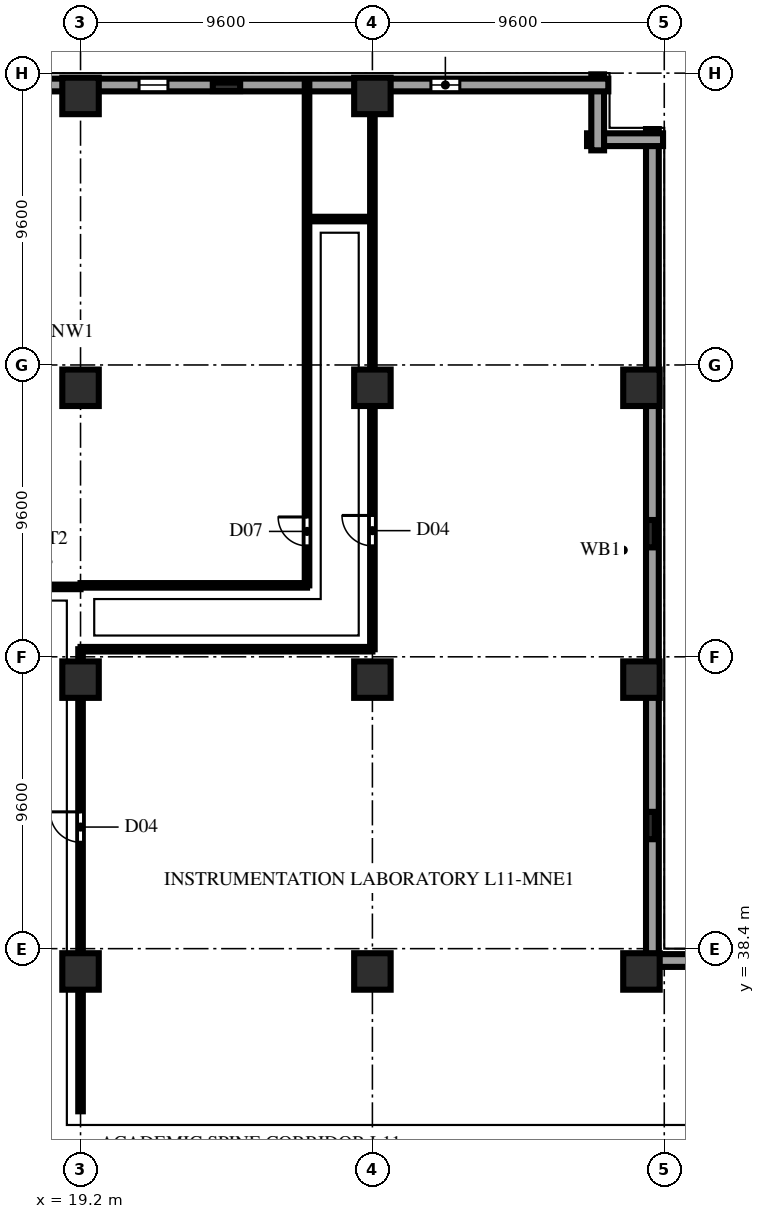
"""IFC4 building model, lengths in metres.
Left out: names, types, materials, properties, quantities, classifications, styles, units other than length and angle.
Written with IfcOpenShell. Run it as: python <this file> out.ifc"""

import sys

from ifc_helpers import new_model, si_unit, direction, frame, frame_2d, origin, origin_2d, place, context, subcontext, project, spatial, rectangle, extrude, element, fill, save


model = new_model("IFC4")
c1 = context("Model", 3, precision=1e-05, world=origin(), true_north=direction((0.0, 1.0)))
c2 = subcontext(c1, "Body", "Model", "MODEL_VIEW")
j1 = project(units=[si_unit("LENGTHUNIT", "METRE"), si_unit("PLANEANGLEUNIT", "RADIAN")], contexts=[c1])
p1 = place(None, origin())
s1 = spatial("IfcSite", under=j1, at=p1, CompositionType="ELEMENT")
p2 = place(p1, origin())
s2 = spatial("IfcBuilding", under=s1, at=p2, CompositionType="ELEMENT")
p3 = place(p2, frame((0.0, 0.0, 47.0)))
s3 = spatial("IfcBuildingStorey", under=s2, at=p3, CompositionType="ELEMENT", Elevation=47.0)
for number, where, z_axis, x_axis in (
    (1, (19.2, 37.65, 0.0), (0.0, 0.0, 1.0), (1.0, 0.0, 0.0)),
    (2, (19.2, 47.25, 0.0), (0.0, 0.0, 1.0), (1.0, 0.0, 0.0)),
    (3, (19.2, 56.85, 0.0), (0.0, 0.0, 1.0), (1.0, 0.0, 0.0)),
    (4, (19.2, 66.45, 0.0), (0.0, 0.0, 1.0), (1.0, 0.0, 0.0)),
    (5, (28.8, 37.65, 0.0), (0.0, 0.0, 1.0), (1.0, 0.0, 0.0)),
    (6, (28.8, 47.25, 0.0), (0.0, 0.0, 1.0), (1.0, 0.0, 0.0)),
    (7, (28.8, 56.85, 0.0), (0.0, 0.0, 1.0), (1.0, 0.0, 0.0)),
    (8, (28.8, 66.45, 0.0), (0.0, 0.0, 1.0), (1.0, 0.0, 0.0)),
    (9, (37.65, 37.65, 0.0), (0.0, 0.0, 1.0), (1.0, 0.0, 0.0)),
    (10, (37.65, 47.25, 0.0), (0.0, 0.0, 1.0), (1.0, 0.0, 0.0)),
    (11, (37.65, 56.85, 0.0), (0.0, 0.0, 1.0), (1.0, 0.0, 0.0)),
):
    element("IfcColumn", number, at=place(p3, frame(where, z_axis=z_axis, x_axis=x_axis)), inside=s3, PredefinedType="COLUMN", context=c2, shape_type="SweptSolid", body=[
        extrude(rectangle(XDim=1.2, YDim=1.2, at=origin_2d()), origin(), (0.0, 0.0, 1.0), 3.8),
    ])
for number, where, z_axis, x_axis in (
    (12, (24.0, 66.75, 0.0), (0.0, 0.0, 1.0), (1.0, 0.0, 0.0)),
    (13, (37.95, 42.45, 0.0), (0.0, 0.0, 1.0), (0.0, 1.0, 0.0)),
    (14, (37.95, 52.05, 0.0), (0.0, 0.0, 1.0), (0.0, 1.0, 0.0)),
):
    element("IfcColumn", number, at=place(p3, frame(where, z_axis=z_axis, x_axis=x_axis)), inside=s3, PredefinedType="PILASTER", context=c2, shape_type="SweptSolid", body=[
        extrude(rectangle(XDim=0.9, YDim=0.28, at=origin_2d()), origin(), (0.0, 0.0, 1.0), 3.8),
    ])
for number, where, z_axis, x_axis in (
    (15, (65.36, 38.01, 0.0), (0.0, 0.0, 1.0), (-1.0, 0.0, 0.0)),
    (16, (38.01, 37.66, 0.0), (0.0, 0.0, 1.0), (0.0, 1.0, 0.0)),
):
    element("IfcWall", number, at=place(p3, frame(where, z_axis=z_axis, x_axis=x_axis)), inside=s3, PredefinedType="SOLIDWALL", context=c2, shape_type="SweptSolid", body=[
        extrude(rectangle(XDim=27.7, YDim=0.42, at=frame_2d((13.85, 0.0))), origin(), (0.0, 0.0, 1.0), 3.54),
    ])
for number, where, z_axis, x_axis in (
    (17, (38.36, 65.01, 0.0), (0.0, 0.0, 1.0), (-1.0, 0.0, 0.0)),
    (18, (36.21, 64.66, 0.0), (0.0, 0.0, 1.0), (0.0, 1.0, 0.0)),
):
    element("IfcWall", number, at=place(p3, frame(where, z_axis=z_axis, x_axis=x_axis)), inside=s3, PredefinedType="SOLIDWALL", context=c2, shape_type="SweptSolid", body=[
        extrude(rectangle(XDim=2.5, YDim=0.42, at=frame_2d((1.25, 0.0))), origin(), (0.0, 0.0, 1.0), 3.54),
    ])
p4 = place(p3, frame((36.56, 66.81, 0.0), z_axis=(0.0, 0.0, 1.0), x_axis=(-1.0, 0.0, 0.0)))
e19 = element("IfcWall", 19, at=p4, inside=s3, PredefinedType="SOLIDWALL", context=c2, shape_type="SweptSolid", body=[
    extrude(rectangle(XDim=34.72, YDim=0.42, at=frame_2d((17.36, 0.0))), origin(), (0.0, 0.0, 1.0), 3.54),
])
p5 = place(p4, frame((4.885, 0.0, 0.9)))
e20 = element("IfcOpeningElement", 20, at=p5, cuts=e19, PredefinedType="OPENING", context=c2, shape_type="SweptSolid", body=[
    extrude(rectangle(XDim=0.95, YDim=1.85, at=frame_2d((0.475, 0.925))), frame((0.0, 0.222, 0.0), z_axis=(0.0, -1.0, 0.0), x_axis=(1.0, 0.0, 0.0)), (0.0, 0.0, 1.0), 0.444),
])
p6 = place(p4, frame((14.485, 0.0, 0.9)))
e21 = element("IfcOpeningElement", 21, at=p6, cuts=e19, PredefinedType="OPENING", context=c2, shape_type="SweptSolid", body=[
    extrude(rectangle(XDim=0.95, YDim=1.85, at=frame_2d((0.475, 0.925))), frame((0.0, 0.222, 0.0), z_axis=(0.0, -1.0, 0.0), x_axis=(1.0, 0.0, 0.0)), (0.0, 0.0, 1.0), 0.444),
])
p7 = place(p3, frame((17.05, 50.3, 0.0), z_axis=(0.0, 0.0, 1.0), x_axis=(1.0, 0.0, 0.0)))
e22 = element("IfcWall", 22, at=p7, inside=s3, PredefinedType="PARTITIONING", context=c2, shape_type="SweptSolid", body=[
    extrude(rectangle(XDim=2.15, YDim=0.15, at=frame_2d((1.075, 0.0))), origin(), (0.0, 0.0, 1.0), 3.54),
])
p8 = place(p3, frame((19.2, 33.05, 0.0), z_axis=(0.0, 0.0, 1.0), x_axis=(0.0, 1.0, 0.0)))
e23 = element("IfcWall", 23, at=p8, inside=s3, PredefinedType="PARTITIONING", context=c2, shape_type="SweptSolid", body=[
    extrude(rectangle(XDim=15.2, YDim=0.15, at=frame_2d((7.6, 0.0))), origin(), (0.0, 0.0, 1.0), 3.184),
])
p9 = place(p8, frame((8.85, 0.0, 0.0)))
e24 = element("IfcOpeningElement", 24, at=p9, cuts=e23, PredefinedType="OPENING", context=c2, shape_type="SweptSolid", body=[
    extrude(rectangle(XDim=1.0, YDim=2.2, at=frame_2d((0.5, 1.1))), frame((0.0, 0.087, 0.0), z_axis=(0.0, -1.0, 0.0), x_axis=(1.0, 0.0, 0.0)), (0.0, 0.0, 1.0), 0.174),
])
p10 = place(p3, frame((19.2, 48.25, 0.0), z_axis=(0.0, 0.0, 1.0), x_axis=(1.0, 0.0, 0.0)))
e25 = element("IfcWall", 25, at=p10, inside=s3, PredefinedType="PARTITIONING", context=c2, shape_type="SweptSolid", body=[
    extrude(rectangle(XDim=9.6, YDim=0.15, at=frame_2d((4.8, 0.0))), origin(), (0.0, 0.0, 1.0), 3.54),
])
p11 = place(p3, frame((19.2, 50.35, 0.0), z_axis=(0.0, 0.0, 1.0), x_axis=(1.0, 0.0, 0.0)))
e26 = element("IfcWall", 26, at=p11, inside=s3, PredefinedType="PARTITIONING", context=c2, shape_type="SweptSolid", body=[
    extrude(rectangle(XDim=7.45, YDim=0.15, at=frame_2d((3.725, 0.0))), origin(), (0.0, 0.0, 1.0), 3.54),
])
p12 = place(p3, frame((26.65, 62.4, 0.0), z_axis=(0.0, 0.0, 1.0), x_axis=(1.0, 0.0, 0.0)))
e27 = element("IfcWall", 27, at=p12, inside=s3, PredefinedType="PARTITIONING", context=c2, shape_type="SweptSolid", body=[
    extrude(rectangle(XDim=2.15, YDim=0.15, at=frame_2d((1.075, 0.0))), origin(), (0.0, 0.0, 1.0), 3.54),
])
p13 = place(p3, frame((28.8, 48.25, 0.0), z_axis=(0.0, 0.0, 1.0), x_axis=(0.0, 1.0, 0.0)))
e28 = element("IfcWall", 28, at=p13, inside=s3, PredefinedType="PARTITIONING", context=c2, shape_type="SweptSolid", body=[
    extrude(rectangle(XDim=18.2, YDim=0.15, at=frame_2d((9.1, 0.0))), origin(), (0.0, 0.0, 1.0), 3.184),
])
p14 = place(p13, frame((3.4, 0.0, 0.0)))
e29 = element("IfcOpeningElement", 29, at=p14, cuts=e28, PredefinedType="OPENING", context=c2, shape_type="SweptSolid", body=[
    extrude(rectangle(XDim=1.0, YDim=2.2, at=frame_2d((0.5, 1.1))), frame((0.0, 0.087, 0.0), z_axis=(0.0, -1.0, 0.0), x_axis=(1.0, 0.0, 0.0)), (0.0, 0.0, 1.0), 0.174),
])
p15 = place(p3, frame((28.8, 66.45, 0.0), z_axis=(0.0, 0.0, 1.0), x_axis=(0.0, 1.0, 0.0)))
e30 = element("IfcWall", 30, at=p15, inside=s3, PredefinedType="PARTITIONING", context=c2, shape_type="SweptSolid", body=[
    extrude(rectangle(XDim=0.53, YDim=0.15, at=frame_2d((0.265, 0.0))), origin(), (0.0, 0.0, 1.0), 3.54),
])
p16 = place(p3, frame((26.65, 50.35, 0.0), z_axis=(0.0, 0.0, 1.0), x_axis=(0.0, 1.0, 0.0)))
e31 = element("IfcWall", 31, at=p16, inside=s3, PredefinedType="PARTITIONING", context=c2, shape_type="SweptSolid", body=[
    extrude(rectangle(XDim=16.63, YDim=0.15, at=frame_2d((8.315, 0.0))), origin(), (0.0, 0.0, 1.0), 3.54),
])
p17 = place(p16, frame((1.3, 0.0, 0.0)))
e32 = element("IfcOpeningElement", 32, at=p17, cuts=e31, PredefinedType="OPENING", context=c2, shape_type="SweptSolid", body=[
    extrude(rectangle(XDim=0.95, YDim=2.15, at=frame_2d((0.475, 1.075))), frame((0.0, 0.087, 0.0), z_axis=(0.0, -1.0, 0.0), x_axis=(1.0, 0.0, 0.0)), (0.0, 0.0, 1.0), 0.174),
])
p18 = place(p5, origin())
e33 = element("IfcWindow", 33, at=p18, inside=s3, PartitioningType="SINGLE_PANEL", PredefinedType="WINDOW", context=c2, shape_type="SweptSolid", body=[
    extrude(rectangle(XDim=0.95, YDim=1.85, at=frame_2d((0.475, 0.925))), frame((0.0, 0.11, 0.0), z_axis=(0.0, -1.0, 0.0), x_axis=(1.0, 0.0, 0.0)), (0.0, 0.0, 1.0), 0.06),
])
fill(e20, e33)
p19 = place(p6, origin())
e34 = element("IfcWindow", 34, at=p19, inside=s3, PartitioningType="SINGLE_PANEL", PredefinedType="WINDOW", context=c2, shape_type="SweptSolid", body=[
    extrude(rectangle(XDim=0.95, YDim=1.85, at=frame_2d((0.475, 0.925))), frame((0.0, 0.11, 0.0), z_axis=(0.0, -1.0, 0.0), x_axis=(1.0, 0.0, 0.0)), (0.0, 0.0, 1.0), 0.06),
])
fill(e21, e34)
p20 = place(p9, origin())
e35 = element("IfcDoor", 35, at=p20, inside=s3, OperationType="SINGLE_SWING_RIGHT", PredefinedType="DOOR", context=c2, shape_type="SweptSolid", body=[
    extrude(rectangle(XDim=1.0, YDim=2.2, at=frame_2d((0.5, 1.1))), frame((0.0, 0.025, 0.0), z_axis=(0.0, -1.0, 0.0), x_axis=(1.0, 0.0, 0.0)), (0.0, 0.0, 1.0), 0.05),
])
fill(e24, e35)
p21 = place(p14, origin())
e36 = element("IfcDoor", 36, at=p21, inside=s3, OperationType="SINGLE_SWING_RIGHT", PredefinedType="DOOR", context=c2, shape_type="SweptSolid", body=[
    extrude(rectangle(XDim=1.0, YDim=2.2, at=frame_2d((0.5, 1.1))), frame((0.0, 0.025, 0.0), z_axis=(0.0, -1.0, 0.0), x_axis=(1.0, 0.0, 0.0)), (0.0, 0.0, 1.0), 0.05),
])
fill(e29, e36)
p22 = place(p17, origin())
e37 = element("IfcDoor", 37, at=p22, inside=s3, OperationType="SINGLE_SWING_RIGHT", PredefinedType="DOOR", context=c2, shape_type="SweptSolid", body=[
    extrude(rectangle(XDim=0.95, YDim=2.15, at=frame_2d((0.475, 1.075))), frame((0.0, 0.025, 0.0), z_axis=(0.0, -1.0, 0.0), x_axis=(1.0, 0.0, 0.0)), (0.0, 0.0, 1.0), 0.05),
])
fill(e32, e37)
save(model, sys.argv[1])
